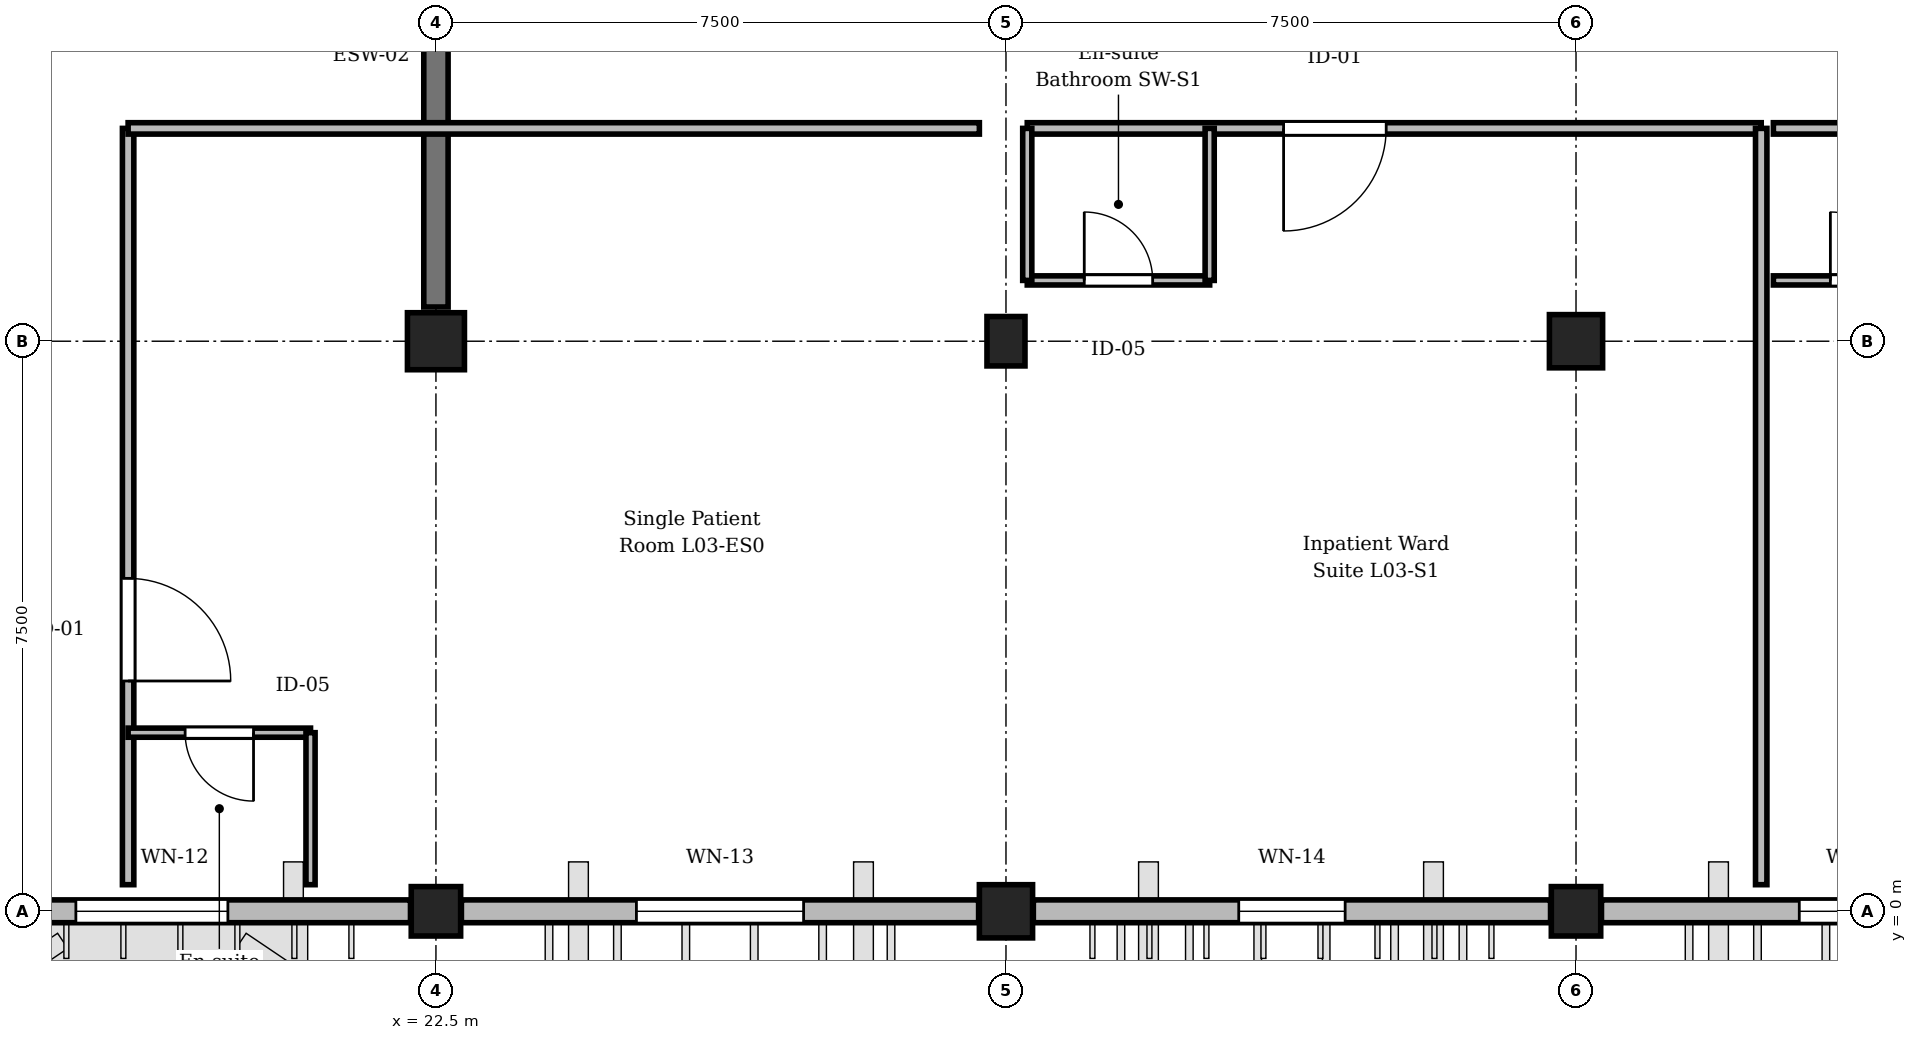
"""IFC4 building model, lengths in metres.
Left out: names, types, materials, properties, quantities, classifications, styles, units other than length and angle.
Written with IfcOpenShell. Run it as: python <this file> out.ifc"""

import sys

from ifc_helpers import new_model, si_unit, direction, frame, frame_2d, origin, origin_2d, place, context, subcontext, project, spatial, rectangle, extrude, element, fill, save


model = new_model("IFC4")
c1 = context("Model", 3, precision=1e-05, world=origin(), true_north=direction((0.0, 1.0)))
c2 = subcontext(c1, "Body", "Model", "MODEL_VIEW")
j1 = project(units=[si_unit("LENGTHUNIT", "METRE"), si_unit("PLANEANGLEUNIT", "RADIAN")], contexts=[c1])
p1 = place(None, origin())
s1 = spatial("IfcSite", under=j1, at=p1, CompositionType="ELEMENT")
p2 = place(p1, origin())
s2 = spatial("IfcBuilding", under=s1, at=p2, CompositionType="ELEMENT")
p3 = place(p2, frame((0.0, 0.0, 14.1)))
s3 = spatial("IfcBuildingStorey", under=s2, at=p3, CompositionType="ELEMENT", Elevation=14.1)
p4 = place(p3, frame((22.5, 0.0, 0.0), z_axis=(0.0, 0.0, 1.0), x_axis=(1.0, 0.0, 0.0)))
e1 = element("IfcColumn", 1, at=p4, inside=s3, PredefinedType="COLUMN", context=c2, shape_type="SweptSolid", body=[
    extrude(rectangle(XDim=0.65, YDim=0.65, at=origin_2d()), origin(), (0.0, 0.0, 1.0), 3.75),
])
p5 = place(p3, frame((22.5, 7.5, 0.0), z_axis=(0.0, 0.0, 1.0), x_axis=(1.0, 0.0, 0.0)))
e2 = element("IfcColumn", 2, at=p5, inside=s3, PredefinedType="COLUMN", context=c2, shape_type="SweptSolid", body=[
    extrude(rectangle(XDim=0.75, YDim=0.75, at=origin_2d()), origin(), (0.0, 0.0, 1.0), 3.75),
])
p6 = place(p3, frame((30.0, 0.0, 0.0), z_axis=(0.0, 0.0, 1.0), x_axis=(1.0, 0.0, 0.0)))
e3 = element("IfcColumn", 3, at=p6, inside=s3, PredefinedType="COLUMN", context=c2, shape_type="SweptSolid", body=[
    extrude(rectangle(XDim=0.7, YDim=0.7, at=origin_2d()), origin(), (0.0, 0.0, 1.0), 3.75),
])
p7 = place(p3, frame((30.0, 7.5, 0.0), z_axis=(0.0, 0.0, 1.0), x_axis=(1.0, 0.0, 0.0)))
e4 = element("IfcColumn", 4, at=p7, inside=s3, PredefinedType="COLUMN", context=c2, shape_type="SweptSolid", body=[
    extrude(rectangle(XDim=0.5, YDim=0.65, at=origin_2d()), origin(), (0.0, 0.0, 1.0), 3.75),
])
p8 = place(p3, frame((37.5, 0.0, 0.0), z_axis=(0.0, 0.0, 1.0), x_axis=(1.0, 0.0, 0.0)))
e5 = element("IfcColumn", 5, at=p8, inside=s3, PredefinedType="COLUMN", context=c2, shape_type="SweptSolid", body=[
    extrude(rectangle(XDim=0.65, YDim=0.65, at=origin_2d()), origin(), (0.0, 0.0, 1.0), 3.75),
])
p9 = place(p3, frame((37.5, 7.5, 0.0), z_axis=(0.0, 0.0, 1.0), x_axis=(1.0, 0.0, 0.0)))
e6 = element("IfcColumn", 6, at=p9, inside=s3, PredefinedType="COLUMN", context=c2, shape_type="SweptSolid", body=[
    extrude(rectangle(XDim=0.7, YDim=0.7, at=origin_2d()), origin(), (0.0, 0.0, 1.0), 3.75),
])
p10 = place(p3, frame((22.5, 7.95, 0.0), z_axis=(0.0, 0.0, 1.0), x_axis=(0.0, 1.0, 0.0)))
e7 = element("IfcWall", 7, at=p10, inside=s3, PredefinedType="SHEAR", context=c2, shape_type="SweptSolid", body=[
    extrude(rectangle(XDim=6.6, YDim=0.32, at=frame_2d((3.3, 0.0))), origin(), (0.0, 0.0, 1.0), 2.92),
])
p11 = place(p3, frame((22.165, 0.0, 0.0), z_axis=(0.0, 0.0, 1.0), x_axis=(-1.0, 0.0, 0.0)))
e8 = element("IfcWall", 8, at=p11, inside=s3, PredefinedType="STANDARD", context=c2, shape_type="SweptSolid", body=[
    extrude(rectangle(XDim=6.805, YDim=0.3, at=frame_2d((3.402, 0.0))), origin(), (0.0, 0.0, 1.0), 2.87),
])
p12 = place(p11, frame((2.403, 0.0, 0.9)))
e9 = element("IfcOpeningElement", 9, at=p12, cuts=e8, PredefinedType="OPENING", context=c2, shape_type="SweptSolid", body=[
    extrude(rectangle(XDim=2.0, YDim=1.69, at=frame_2d((1.0, 0.845))), frame((0.0, 0.16, 0.0), z_axis=(0.0, -1.0, 0.0), x_axis=(1.0, 0.0, 0.0)), (0.0, 0.0, 1.0), 0.32),
])
p13 = place(p3, frame((29.64, 0.0, 0.0), z_axis=(0.0, 0.0, 1.0), x_axis=(-1.0, 0.0, 0.0)))
e10 = element("IfcWall", 10, at=p13, inside=s3, PredefinedType="STANDARD", context=c2, shape_type="SweptSolid", body=[
    extrude(rectangle(XDim=6.805, YDim=0.3, at=frame_2d((3.402, 0.0))), origin(), (0.0, 0.0, 1.0), 2.87),
])
p14 = place(p13, frame((2.302, 0.0, 0.9)))
e11 = element("IfcOpeningElement", 11, at=p14, cuts=e10, PredefinedType="OPENING", context=c2, shape_type="SweptSolid", body=[
    extrude(rectangle(XDim=2.2, YDim=1.69, at=frame_2d((1.1, 0.845))), frame((0.0, 0.16, 0.0), z_axis=(0.0, -1.0, 0.0), x_axis=(1.0, 0.0, 0.0)), (0.0, 0.0, 1.0), 0.32),
])
p15 = place(p3, frame((37.165, 0.0, 0.0), z_axis=(0.0, 0.0, 1.0), x_axis=(-1.0, 0.0, 0.0)))
e12 = element("IfcWall", 12, at=p15, inside=s3, PredefinedType="STANDARD", context=c2, shape_type="SweptSolid", body=[
    extrude(rectangle(XDim=6.805, YDim=0.3, at=frame_2d((3.402, 0.0))), origin(), (0.0, 0.0, 1.0), 2.87),
])
p16 = place(p15, frame((2.702, 0.0, 0.9)))
e13 = element("IfcOpeningElement", 13, at=p16, cuts=e12, PredefinedType="OPENING", context=c2, shape_type="SweptSolid", body=[
    extrude(rectangle(XDim=1.4, YDim=1.69, at=frame_2d((0.7, 0.845))), frame((0.0, 0.16, 0.0), z_axis=(0.0, -1.0, 0.0), x_axis=(1.0, 0.0, 0.0)), (0.0, 0.0, 1.0), 0.32),
])
p17 = place(p3, frame((44.64, 0.0, 0.0), z_axis=(0.0, 0.0, 1.0), x_axis=(-1.0, 0.0, 0.0)))
e14 = element("IfcWall", 14, at=p17, inside=s3, PredefinedType="STANDARD", context=c2, shape_type="SweptSolid", body=[
    extrude(rectangle(XDim=6.805, YDim=0.3, at=frame_2d((3.402, 0.0))), origin(), (0.0, 0.0, 1.0), 2.87),
])
p18 = place(p17, frame((2.603, 0.0, 0.9)))
e15 = element("IfcOpeningElement", 15, at=p18, cuts=e14, PredefinedType="OPENING", context=c2, shape_type="SweptSolid", body=[
    extrude(rectangle(XDim=1.6, YDim=1.69, at=frame_2d((0.8, 0.845))), frame((0.0, 0.16, 0.0), z_axis=(0.0, -1.0, 0.0), x_axis=(1.0, 0.0, 0.0)), (0.0, 0.0, 1.0), 0.32),
])
p19 = place(p3, frame((18.45, 10.3, 0.0), z_axis=(0.0, 0.0, 1.0), x_axis=(0.0, -1.0, 0.0)))
e16 = element("IfcWall", 16, at=p19, inside=s3, PredefinedType="PARTITIONING", context=c2, shape_type="SweptSolid", body=[
    extrude(rectangle(XDim=9.95, YDim=0.15, at=frame_2d((4.975, 0.0))), origin(), (0.0, 0.0, 1.0), 3.455),
])
p20 = place(p19, frame((5.92, 0.0, 0.0)))
e17 = element("IfcOpeningElement", 17, at=p20, cuts=e16, PredefinedType="OPENING", context=c2, shape_type="SweptSolid", body=[
    extrude(rectangle(XDim=1.35, YDim=2.25, at=frame_2d((0.675, 1.125))), frame((0.0, 0.085, 0.0), z_axis=(0.0, -1.0, 0.0), x_axis=(1.0, 0.0, 0.0)), (0.0, 0.0, 1.0), 0.17),
])
p21 = place(p3, frame((20.85, 2.35, 0.0), z_axis=(0.0, 0.0, 1.0), x_axis=(-1.0, 0.0, 0.0)))
e18 = element("IfcWall", 18, at=p21, inside=s3, PredefinedType="PARTITIONING", context=c2, shape_type="SweptSolid", body=[
    extrude(rectangle(XDim=2.4, YDim=0.12, at=frame_2d((1.2, 0.0))), origin(), (0.0, 0.0, 1.0), 3.455),
])
p22 = place(p21, frame((0.75, 0.0, 0.0)))
e19 = element("IfcOpeningElement", 19, at=p22, cuts=e18, PredefinedType="OPENING", context=c2, shape_type="SweptSolid", body=[
    extrude(rectangle(XDim=0.9, YDim=2.1, at=frame_2d((0.45, 1.05))), frame((0.0, 0.07, 0.0), z_axis=(0.0, -1.0, 0.0), x_axis=(1.0, 0.0, 0.0)), (0.0, 0.0, 1.0), 0.14),
])
p23 = place(p3, frame((20.85, 0.35, 0.0), z_axis=(0.0, 0.0, 1.0), x_axis=(0.0, 1.0, 0.0)))
e20 = element("IfcWall", 20, at=p23, inside=s3, PredefinedType="PARTITIONING", context=c2, shape_type="SweptSolid", body=[
    extrude(rectangle(XDim=2.0, YDim=0.12, at=frame_2d((1.0, 0.0))), origin(), (0.0, 0.0, 1.0), 3.455),
])
p24 = place(p3, frame((39.937, 10.3, 0.0), z_axis=(0.0, 0.0, 1.0), x_axis=(-1.0, 0.0, 0.0)))
e21 = element("IfcWall", 21, at=p24, inside=s3, PredefinedType="PARTITIONING", context=c2, shape_type="SweptSolid", body=[
    extrude(rectangle(XDim=9.657, YDim=0.15, at=frame_2d((4.828, 0.0))), origin(), (0.0, 0.0, 1.0), 3.455),
])
p25 = place(p24, frame((4.934, 0.0, 0.0)))
e22 = element("IfcOpeningElement", 22, at=p25, cuts=e21, PredefinedType="OPENING", context=c2, shape_type="SweptSolid", body=[
    extrude(rectangle(XDim=1.35, YDim=2.25, at=frame_2d((0.675, 1.125))), frame((0.0, 0.085, 0.0), z_axis=(0.0, -1.0, 0.0), x_axis=(1.0, 0.0, 0.0)), (0.0, 0.0, 1.0), 0.17),
])
p26 = place(p3, frame((30.28, 8.3, 0.0), z_axis=(0.0, 0.0, 1.0), x_axis=(1.0, 0.0, 0.0)))
e23 = element("IfcWall", 23, at=p26, inside=s3, PredefinedType="PARTITIONING", context=c2, shape_type="SweptSolid", body=[
    extrude(rectangle(XDim=2.4, YDim=0.12, at=frame_2d((1.2, 0.0))), origin(), (0.0, 0.0, 1.0), 3.455),
])
p27 = place(p26, frame((0.75, 0.0, 0.0)))
e24 = element("IfcOpeningElement", 24, at=p27, cuts=e23, PredefinedType="OPENING", context=c2, shape_type="SweptSolid", body=[
    extrude(rectangle(XDim=0.9, YDim=2.1, at=frame_2d((0.45, 1.05))), frame((0.0, 0.07, 0.0), z_axis=(0.0, -1.0, 0.0), x_axis=(1.0, 0.0, 0.0)), (0.0, 0.0, 1.0), 0.14),
])
p28 = place(p3, frame((32.68, 8.3, 0.0), z_axis=(0.0, 0.0, 1.0), x_axis=(0.0, 1.0, 0.0)))
e25 = element("IfcWall", 25, at=p28, inside=s3, PredefinedType="PARTITIONING", context=c2, shape_type="SweptSolid", body=[
    extrude(rectangle(XDim=2.0, YDim=0.12, at=frame_2d((1.0, 0.0))), origin(), (0.0, 0.0, 1.0), 3.455),
])
p29 = place(p3, frame((49.753, 10.3, 0.0), z_axis=(0.0, 0.0, 1.0), x_axis=(-1.0, 0.0, 0.0)))
e26 = element("IfcWall", 26, at=p29, inside=s3, PredefinedType="PARTITIONING", context=c2, shape_type="SweptSolid", body=[
    extrude(rectangle(XDim=9.657, YDim=0.15, at=frame_2d((4.828, 0.0))), origin(), (0.0, 0.0, 1.0), 3.455),
])
p30 = place(p29, frame((0.25, 0.0, 0.0)))
e27 = element("IfcOpeningElement", 27, at=p30, cuts=e26, PredefinedType="OPENING", context=c2, shape_type="SweptSolid", body=[
    extrude(rectangle(XDim=1.35, YDim=2.25, at=frame_2d((0.675, 1.125))), frame((0.0, 0.085, 0.0), z_axis=(0.0, -1.0, 0.0), x_axis=(1.0, 0.0, 0.0)), (0.0, 0.0, 1.0), 0.17),
])
p31 = place(p3, frame((40.097, 8.3, 0.0), z_axis=(0.0, 0.0, 1.0), x_axis=(1.0, 0.0, 0.0)))
e28 = element("IfcWall", 28, at=p31, inside=s3, PredefinedType="PARTITIONING", context=c2, shape_type="SweptSolid", body=[
    extrude(rectangle(XDim=2.4, YDim=0.12, at=frame_2d((1.2, 0.0))), origin(), (0.0, 0.0, 1.0), 3.455),
])
p32 = place(p31, frame((0.75, 0.0, 0.0)))
e29 = element("IfcOpeningElement", 29, at=p32, cuts=e28, PredefinedType="OPENING", context=c2, shape_type="SweptSolid", body=[
    extrude(rectangle(XDim=0.9, YDim=2.1, at=frame_2d((0.45, 1.05))), frame((0.0, 0.07, 0.0), z_axis=(0.0, -1.0, 0.0), x_axis=(1.0, 0.0, 0.0)), (0.0, 0.0, 1.0), 0.14),
])
p33 = place(p3, frame((18.45, 10.3, 0.0), z_axis=(0.0, 0.0, 1.0), x_axis=(1.0, 0.0, 0.0)))
e30 = element("IfcWall", 30, at=p33, inside=s3, PredefinedType="PARTITIONING", context=c2, shape_type="SweptSolid", body=[
    extrude(rectangle(XDim=11.2, YDim=0.15, at=frame_2d((5.6, 0.0))), origin(), (0.0, 0.0, 1.0), 3.455),
])
p34 = place(p3, frame((39.937, 0.35, 0.0), z_axis=(0.0, 0.0, 1.0), x_axis=(0.0, 1.0, 0.0)))
e31 = element("IfcWall", 31, at=p34, inside=s3, PredefinedType="PARTITIONING", context=c2, shape_type="SweptSolid", body=[
    extrude(rectangle(XDim=9.95, YDim=0.15, at=frame_2d((4.975, 0.0))), origin(), (0.0, 0.0, 1.0), 3.455),
])
p35 = place(p3, frame((30.28, 8.3, 0.0), z_axis=(0.0, 0.0, 1.0), x_axis=(0.0, 1.0, 0.0)))
e32 = element("IfcWall", 32, at=p35, inside=s3, PredefinedType="PARTITIONING", context=c2, shape_type="SweptSolid", body=[
    extrude(rectangle(XDim=2.0, YDim=0.12, at=frame_2d((1.0, 0.0))), origin(), (0.0, 0.0, 1.0), 2.955),
])
p36 = place(p12, origin())
e33 = element("IfcWindow", 33, at=p36, inside=s3, PartitioningType="SINGLE_PANEL", PredefinedType="WINDOW", context=c2, shape_type="SweptSolid", body=[
    extrude(rectangle(XDim=2.0, YDim=1.69, at=frame_2d((1.0, 0.845))), frame((0.0, 0.03, 0.0), z_axis=(0.0, -1.0, 0.0), x_axis=(1.0, 0.0, 0.0)), (0.0, 0.0, 1.0), 0.06),
])
fill(e9, e33)
p37 = place(p14, origin())
e34 = element("IfcWindow", 34, at=p37, inside=s3, PartitioningType="SINGLE_PANEL", PredefinedType="WINDOW", context=c2, shape_type="SweptSolid", body=[
    extrude(rectangle(XDim=2.2, YDim=1.69, at=frame_2d((1.1, 0.845))), frame((0.0, 0.03, 0.0), z_axis=(0.0, -1.0, 0.0), x_axis=(1.0, 0.0, 0.0)), (0.0, 0.0, 1.0), 0.06),
])
fill(e11, e34)
p38 = place(p16, origin())
e35 = element("IfcWindow", 35, at=p38, inside=s3, PartitioningType="SINGLE_PANEL", PredefinedType="WINDOW", context=c2, shape_type="SweptSolid", body=[
    extrude(rectangle(XDim=1.4, YDim=1.69, at=frame_2d((0.7, 0.845))), frame((0.0, 0.03, 0.0), z_axis=(0.0, -1.0, 0.0), x_axis=(1.0, 0.0, 0.0)), (0.0, 0.0, 1.0), 0.06),
])
fill(e13, e35)
p39 = place(p18, origin())
e36 = element("IfcWindow", 36, at=p39, inside=s3, PartitioningType="SINGLE_PANEL", PredefinedType="WINDOW", context=c2, shape_type="SweptSolid", body=[
    extrude(rectangle(XDim=1.6, YDim=1.69, at=frame_2d((0.8, 0.845))), frame((0.0, 0.03, 0.0), z_axis=(0.0, -1.0, 0.0), x_axis=(1.0, 0.0, 0.0)), (0.0, 0.0, 1.0), 0.06),
])
fill(e15, e36)
p40 = place(p20, origin())
e37 = element("IfcDoor", 37, at=p40, inside=s3, OperationType="SINGLE_SWING_RIGHT", PredefinedType="DOOR", context=c2, shape_type="SweptSolid", body=[
    extrude(rectangle(XDim=1.35, YDim=2.25, at=frame_2d((0.675, 1.125))), frame((0.0, 0.025, 0.0), z_axis=(0.0, -1.0, 0.0), x_axis=(1.0, 0.0, 0.0)), (0.0, 0.0, 1.0), 0.05),
])
fill(e17, e37)
p41 = place(p22, origin())
e38 = element("IfcDoor", 38, at=p41, inside=s3, OperationType="SINGLE_SWING_LEFT", PredefinedType="DOOR", context=c2, shape_type="SweptSolid", body=[
    extrude(rectangle(XDim=0.9, YDim=2.1, at=frame_2d((0.45, 1.05))), frame((0.0, 0.025, 0.0), z_axis=(0.0, -1.0, 0.0), x_axis=(1.0, 0.0, 0.0)), (0.0, 0.0, 1.0), 0.05),
])
fill(e19, e38)
p42 = place(p25, origin())
e39 = element("IfcDoor", 39, at=p42, inside=s3, OperationType="SINGLE_SWING_RIGHT", PredefinedType="DOOR", context=c2, shape_type="SweptSolid", body=[
    extrude(rectangle(XDim=1.35, YDim=2.25, at=frame_2d((0.675, 1.125))), frame((0.0, 0.025, 0.0), z_axis=(0.0, -1.0, 0.0), x_axis=(1.0, 0.0, 0.0)), (0.0, 0.0, 1.0), 0.05),
])
fill(e22, e39)
p43 = place(p27, origin())
e40 = element("IfcDoor", 40, at=p43, inside=s3, OperationType="SINGLE_SWING_LEFT", PredefinedType="DOOR", context=c2, shape_type="SweptSolid", body=[
    extrude(rectangle(XDim=0.9, YDim=2.1, at=frame_2d((0.45, 1.05))), frame((0.0, 0.025, 0.0), z_axis=(0.0, -1.0, 0.0), x_axis=(1.0, 0.0, 0.0)), (0.0, 0.0, 1.0), 0.05),
])
fill(e24, e40)
p44 = place(p32, origin())
e41 = element("IfcDoor", 41, at=p44, inside=s3, OperationType="SINGLE_SWING_LEFT", PredefinedType="DOOR", context=c2, shape_type="SweptSolid", body=[
    extrude(rectangle(XDim=0.9, YDim=2.1, at=frame_2d((0.45, 1.05))), frame((0.0, 0.025, 0.0), z_axis=(0.0, -1.0, 0.0), x_axis=(1.0, 0.0, 0.0)), (0.0, 0.0, 1.0), 0.05),
])
fill(e29, e41)
save(model, sys.argv[1])
